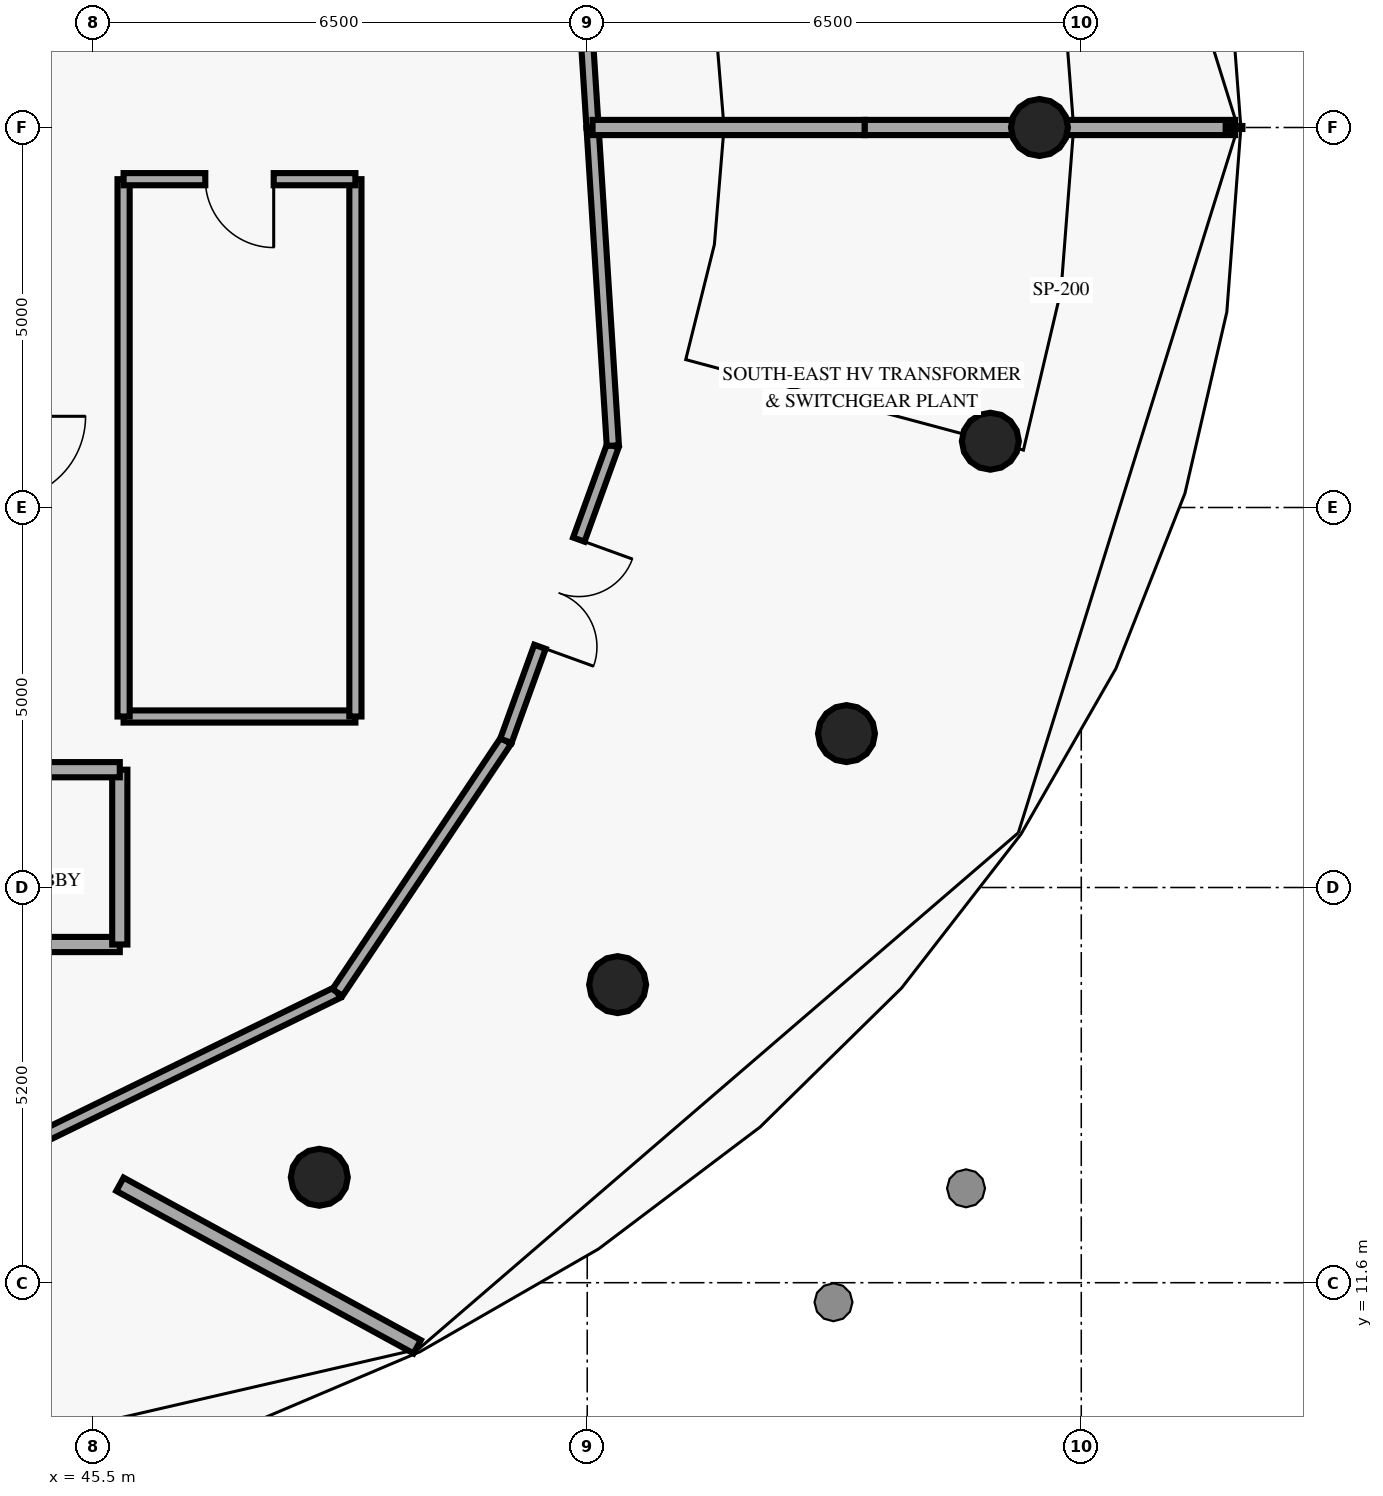
"""IFC4 building model, lengths in metres.
Left out: names, types, materials, properties, quantities, classifications, styles, units other than length and angle.
Written with IfcOpenShell. Run it as: python <this file> out.ifc"""

import sys

from ifc_helpers import new_model, si_unit, direction, frame, frame_2d, origin, origin_2d, place, context, subcontext, project, spatial, rectangle, circle, extrude, element, fill, save


model = new_model("IFC4")
c1 = context("Model", 3, precision=1e-05, world=origin(), true_north=direction((0.0, 1.0)))
c2 = subcontext(c1, "Body", "Model", "MODEL_VIEW")
j1 = project(units=[si_unit("LENGTHUNIT", "METRE"), si_unit("PLANEANGLEUNIT", "RADIAN")], contexts=[c1])
p1 = place(None, origin())
s1 = spatial("IfcSite", under=j1, at=p1, CompositionType="ELEMENT")
p2 = place(p1, origin())
s2 = spatial("IfcBuilding", under=s1, at=p2, CompositionType="ELEMENT")
p3 = place(p2, frame((0.0, 0.0, 301.2)))
s3 = spatial("IfcBuildingStorey", under=s2, at=p3, CompositionType="ELEMENT", Elevation=301.2)
for number, where, z_axis, x_axis in (
    (1, (57.95, 26.8, 0.0), (0.0, 0.0, 1.0), (1.0, 0.0, 0.0)),
    (2, (48.475, 12.987, 0.0), (0.0, 0.0, 1.0), (1.0, 0.0, 0.0)),
    (3, (52.4, 15.522, 0.0), (0.0, 0.0, 1.0), (1.0, 0.0, 0.0)),
    (4, (55.411, 18.825, 0.0), (0.0, 0.0, 1.0), (1.0, 0.0, 0.0)),
    (5, (57.304, 22.672, 0.0), (0.0, 0.0, 1.0), (1.0, 0.0, 0.0)),
):
    element("IfcColumn", number, at=place(p3, frame(where, z_axis=z_axis, x_axis=x_axis)), inside=s3, PredefinedType="COLUMN", context=c2, shape_type="SweptSolid", body=[
        extrude(circle(Radius=0.375, at=origin_2d()), origin(), (0.0, 0.0, 1.0), 5.25),
    ])
p4 = place(p3, frame((45.9, 19.05, 0.0), z_axis=(0.0, 0.0, 1.0), x_axis=(1.0, 0.0, 0.0)))
e6 = element("IfcWall", 6, at=p4, inside=s3, PredefinedType="PARTITIONING", context=c2, shape_type="SweptSolid", body=[
    extrude(rectangle(XDim=3.05, YDim=0.16, at=frame_2d((1.525, 0.0))), origin(), (0.0, 0.0, 1.0), 5.25),
])
for number, where, z_axis, x_axis in (
    (7, (48.95, 19.05, 0.0), (0.0, 0.0, 1.0), (0.0, 1.0, 0.0)),
    (8, (45.9, 19.05, 0.0), (0.0, 0.0, 1.0), (0.0, 1.0, 0.0)),
):
    element("IfcWall", number, at=place(p3, frame(where, z_axis=z_axis, x_axis=x_axis)), inside=s3, PredefinedType="PARTITIONING", context=c2, shape_type="SweptSolid", body=[
        extrude(rectangle(XDim=7.07, YDim=0.16, at=frame_2d((3.535, 0.0))), origin(), (0.0, 0.0, 1.0), 5.25),
    ])
p5 = place(p3, frame((48.95, 26.12, 0.0), z_axis=(0.0, 0.0, 1.0), x_axis=(-1.0, 0.0, 0.0)))
e9 = element("IfcWall", 9, at=p5, inside=s3, PredefinedType="PARTITIONING", context=c2, shape_type="SweptSolid", body=[
    extrude(rectangle(XDim=3.05, YDim=0.16, at=frame_2d((1.525, 0.0))), origin(), (0.0, 0.0, 1.0), 5.25),
])
p6 = place(p5, frame((1.075, 0.0, 0.0)))
e10 = element("IfcOpeningElement", 10, at=p6, cuts=e9, PredefinedType="OPENING", context=c2, shape_type="SweptSolid", body=[
    extrude(rectangle(XDim=0.9, YDim=2.1, at=frame_2d((0.45, 1.05))), frame((0.0, 0.09, 0.0), z_axis=(0.0, -1.0, 0.0), x_axis=(1.0, 0.0, 0.0)), (0.0, 0.0, 1.0), 0.18),
])
p7 = place(p3, frame((41.35, 16.05, 0.0), z_axis=(0.0, 0.0, 1.0), x_axis=(1.0, 0.0, 0.0)))
e11 = element("IfcWall", 11, at=p7, inside=s3, PredefinedType="SOLIDWALL", context=c2, shape_type="SweptSolid", body=[
    extrude(rectangle(XDim=4.5, YDim=0.2, at=frame_2d((2.25, 0.0))), origin(), (0.0, 0.0, 1.0), 5.25),
])
p8 = place(p3, frame((45.85, 16.05, 0.0), z_axis=(0.0, 0.0, 1.0), x_axis=(0.0, 1.0, 0.0)))
e12 = element("IfcWall", 12, at=p8, inside=s3, PredefinedType="SOLIDWALL", context=c2, shape_type="SweptSolid", body=[
    extrude(rectangle(XDim=2.3, YDim=0.2, at=frame_2d((1.15, 0.0))), origin(), (0.0, 0.0, 1.0), 5.25),
])
p9 = place(p3, frame((44.3, 18.35, 0.0), z_axis=(0.0, 0.0, 1.0), x_axis=(1.0, 0.0, 0.0)))
e13 = element("IfcWall", 13, at=p9, inside=s3, PredefinedType="SOLIDWALL", context=c2, shape_type="SweptSolid", body=[
    extrude(rectangle(XDim=1.55, YDim=0.2, at=frame_2d((0.775, 0.0))), origin(), (0.0, 0.0, 1.0), 5.25),
])
p10 = place(p3, frame((52.07, 26.8, 0.0), z_axis=(0.0, 0.0, 1.0), x_axis=(-0.064030047677, 0.997947971086, 0.0)))
e14 = element("IfcWall", 14, at=p10, inside=s3, PredefinedType="PARTITIONING", context=c2, shape_type="SweptSolid", body=[
    extrude(rectangle(XDim=4.03, YDim=0.16, at=frame_2d((2.015, 0.0))), origin(), (0.0, 0.0, 1.0), 5.25),
])
p11 = place(p3, frame((44.369, 13.295, 0.0), z_axis=(0.0, 0.0, 1.0), x_axis=(0.898488801633, 0.43899643887, 0.0)))
e15 = element("IfcWall", 15, at=p11, inside=s3, PredefinedType="PARTITIONING", context=c2, shape_type="SweptSolid", body=[
    extrude(rectangle(XDim=4.836, YDim=0.16, at=frame_2d((2.418, 0.0))), origin(), (0.0, 0.0, 1.0), 5.25),
])
p12 = place(p3, frame((48.714, 15.418, 0.0), z_axis=(0.0, 0.0, 1.0), x_axis=(0.556056751682, 0.831144324958, 0.0)))
e16 = element("IfcWall", 16, at=p12, inside=s3, PredefinedType="PARTITIONING", context=c2, shape_type="SweptSolid", body=[
    extrude(rectangle(XDim=3.985, YDim=0.16, at=frame_2d((1.992, 0.0))), origin(), (0.0, 0.0, 1.0), 5.25),
])
p13 = place(p3, frame((52.337, 22.614, 0.0), z_axis=(0.0, 0.0, 1.0), x_axis=(-0.34058972089, -0.940212019719, 0.0)))
e17 = element("IfcWall", 17, at=p13, inside=s3, PredefinedType="PARTITIONING", context=c2, shape_type="SweptSolid", body=[
    extrude(rectangle(XDim=4.131, YDim=0.16, at=frame_2d((2.065, 0.0))), origin(), (0.0, 0.0, 1.0), 5.25),
])
p14 = place(p13, frame((1.315, 0.0, 0.0)))
e18 = element("IfcOpeningElement", 18, at=p14, cuts=e17, PredefinedType="OPENING", context=c2, shape_type="SweptSolid", body=[
    extrude(rectangle(XDim=1.5, YDim=2.2, at=frame_2d((0.75, 1.1))), frame((0.0, 0.09, 0.0), z_axis=(0.0, -1.0, 0.0), x_axis=(1.0, 0.0, 0.0)), (0.0, 0.0, 1.0), 0.18),
])
p15 = place(p3, frame((52.337, 22.614, 0.0), z_axis=(0.0, 0.0, 1.0), x_axis=(-0.063617518313, 0.997974354061, 0.0)))
e19 = element("IfcWall", 19, at=p15, inside=s3, PredefinedType="PARTITIONING", context=c2, shape_type="SweptSolid", body=[
    extrude(rectangle(XDim=4.195, YDim=0.16, at=frame_2d((2.097, 0.0))), origin(), (0.0, 0.0, 1.0), 5.25),
])
p16 = place(p3, frame((52.07, 26.8, 0.0), z_axis=(0.0, 0.0, 1.0), x_axis=(1.0, 0.0, 0.0)))
e20 = element("IfcWall", 20, at=p16, inside=s3, PredefinedType="SOLIDWALL", context=c2, shape_type="SweptSolid", body=[
    extrude(rectangle(XDim=3.582, YDim=0.2, at=frame_2d((1.791, 0.0))), origin(), (0.0, 0.0, 1.0), 5.25),
])
p17 = place(p3, frame((55.652, 26.8, 0.0), z_axis=(0.0, 0.0, 1.0), x_axis=(1.0, 0.0, 0.0)))
e21 = element("IfcWall", 21, at=p17, inside=s3, PredefinedType="SOLIDWALL", context=c2, shape_type="SweptSolid", body=[
    extrude(rectangle(XDim=2.314, YDim=0.2, at=frame_2d((1.157, 0.0))), origin(), (0.0, 0.0, 1.0), 3.45),
])
p18 = place(p3, frame((57.966, 26.8, 0.0), z_axis=(0.0, 0.0, 1.0), x_axis=(1.0, 0.0, 0.0)))
e22 = element("IfcWall", 22, at=p18, inside=s3, PredefinedType="SOLIDWALL", context=c2, shape_type="SweptSolid", body=[
    extrude(rectangle(XDim=2.559, YDim=0.2, at=frame_2d((1.279, 0.0))), origin(), (0.0, 0.0, 1.0), 5.25),
])
p19 = place(p3, frame((45.852, 12.895, 0.0), z_axis=(0.0, 0.0, 1.0), x_axis=(0.877449312493, -0.479669369468, 0.0)))
e23 = element("IfcWall", 23, at=p19, inside=s3, PredefinedType="SOLIDWALL", context=c2, shape_type="SweptSolid", body=[
    extrude(rectangle(XDim=4.457, YDim=0.2, at=frame_2d((2.229, 0.0))), origin(), (0.0, 0.0, 1.0), 5.25),
])
p20 = place(p6, origin())
e24 = element("IfcDoor", 24, at=p20, inside=s3, OperationType="SINGLE_SWING_LEFT", PredefinedType="DOOR", context=c2, shape_type="SweptSolid", body=[
    extrude(rectangle(XDim=0.9, YDim=2.1, at=frame_2d((0.45, 1.05))), frame((0.0, 0.025, 0.0), z_axis=(0.0, -1.0, 0.0), x_axis=(1.0, 0.0, 0.0)), (0.0, 0.0, 1.0), 0.05),
])
fill(e10, e24)
p21 = place(p14, origin())
e25 = element("IfcDoor", 25, at=p21, inside=s3, OperationType="DOUBLE_DOOR_SINGLE_SWING", PredefinedType="DOOR", context=c2, shape_type="SweptSolid", body=[
    extrude(rectangle(XDim=1.5, YDim=2.2, at=frame_2d((0.75, 1.1))), frame((0.0, 0.025, 0.0), z_axis=(0.0, -1.0, 0.0), x_axis=(1.0, 0.0, 0.0)), (0.0, 0.0, 1.0), 0.05),
])
fill(e18, e25)
save(model, sys.argv[1])
